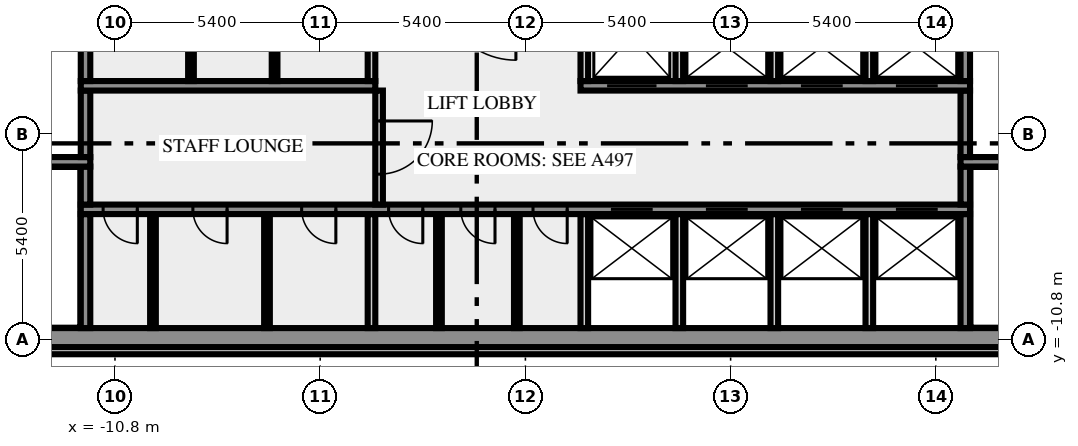
"""IFC4 building model, lengths in metres.
Left out: names, types, materials, properties, quantities, classifications, styles, units other than length and angle.
Written with IfcOpenShell. Run it as: python <this file> out.ifc"""

import sys

from ifc_helpers import new_model, si_unit, direction, frame, frame_2d, origin, place, context, subcontext, project, spatial, rectangle, extrude, element, fill, save


model = new_model("IFC4")
c1 = context("Model", 3, precision=1e-05, world=origin(), true_north=direction((0.0, 1.0)))
c2 = subcontext(c1, "Body", "Model", "MODEL_VIEW")
j1 = project(units=[si_unit("LENGTHUNIT", "METRE"), si_unit("PLANEANGLEUNIT", "RADIAN")], contexts=[c1])
p1 = place(None, origin())
s1 = spatial("IfcSite", under=j1, at=p1, CompositionType="ELEMENT")
p2 = place(p1, origin())
s2 = spatial("IfcBuilding", under=s1, at=p2, CompositionType="ELEMENT")
p3 = place(p2, frame((0.0, 0.0, 222.0)))
s3 = spatial("IfcBuildingStorey", under=s2, at=p3, CompositionType="ELEMENT", Elevation=222.0)
p4 = place(p3, frame((-17.444, -11.088, 0.0), z_axis=(0.0, 0.0, 1.0), x_axis=(1.0, 0.0, 0.0)))
e1 = element("IfcWall", 1, at=p4, inside=s3, PredefinedType="SOLIDWALL", context=c2, shape_type="SweptSolid", body=[
    extrude(rectangle(XDim=34.888, YDim=0.2, at=frame_2d((17.444, 0.0))), origin(), (0.0, 0.0, 1.0), 3.65),
])
p5 = place(p3, frame((-20.0, -10.75, 0.0), z_axis=(0.0, 0.0, 1.0), x_axis=(1.0, 0.0, 0.0)))
e2 = element("IfcWall", 2, at=p5, inside=s3, PredefinedType="SHEAR", context=c2, shape_type="SweptSolid", body=[
    extrude(rectangle(XDim=40.0, YDim=0.5, at=frame_2d((20.0, 0.0))), origin(), (0.0, 0.0, 1.0), 3.65),
])
p6 = place(p5, frame((0.8, 0.0, 1.0)))
e3 = element("IfcOpeningElement", 3, at=p6, cuts=e2, PredefinedType="OPENING", context=c2, shape_type="SweptSolid", body=[
    extrude(rectangle(XDim=1.2, YDim=1.2, at=frame_2d((0.6, 0.6))), frame((0.0, 0.26, 0.0), z_axis=(0.0, -1.0, 0.0), x_axis=(1.0, 0.0, 0.0)), (0.0, 0.0, 1.0), 0.52),
])
p7 = place(p5, frame((38.0, 0.0, 1.0)))
e4 = element("IfcOpeningElement", 4, at=p7, cuts=e2, PredefinedType="OPENING", context=c2, shape_type="SweptSolid", body=[
    extrude(rectangle(XDim=1.2, YDim=1.2, at=frame_2d((0.6, 0.6))), frame((0.0, 0.26, 0.0), z_axis=(0.0, -1.0, 0.0), x_axis=(1.0, 0.0, 0.0)), (0.0, 0.0, 1.0), 0.52),
])
p8 = place(p3, frame((-11.575, -10.5, 0.0), z_axis=(0.0, 0.0, 1.0), x_axis=(0.0, 1.0, 0.0)))
e5 = element("IfcWall", 5, at=p8, inside=s3, PredefinedType="SHEAR", context=c2, shape_type="SweptSolid", body=[
    extrude(rectangle(XDim=3.0, YDim=0.25, at=frame_2d((1.5, 0.0))), origin(), (0.0, 0.0, 1.0), 3.65),
])
for number, where, z_axis, x_axis in (
    (6, (-9.8, -10.5, 0.0), (0.0, 0.0, 1.0), (0.0, 1.0, 0.0)),
    (7, (-6.8, -10.5, 0.0), (0.0, 0.0, 1.0), (0.0, 1.0, 0.0)),
):
    element("IfcWall", number, at=place(p3, frame(where, z_axis=z_axis, x_axis=x_axis)), inside=s3, PredefinedType="PARTITIONING", context=c2, shape_type="SweptSolid", body=[
        extrude(rectangle(XDim=3.0, YDim=0.15, at=frame_2d((1.5, 0.0))), origin(), (0.0, 0.0, 1.0), 3.65),
    ])
p9 = place(p3, frame((-4.05, -10.5, 0.0), z_axis=(0.0, 0.0, 1.0), x_axis=(0.0, 1.0, 0.0)))
e8 = element("IfcWall", 8, at=p9, inside=s3, PredefinedType="SOLIDWALL", context=c2, shape_type="SweptSolid", body=[
    extrude(rectangle(XDim=3.0, YDim=0.2, at=frame_2d((1.5, 0.0))), origin(), (0.0, 0.0, 1.0), 3.65),
])
for number, where, z_axis, x_axis in (
    (9, (-2.275, -10.5, 0.0), (0.0, 0.0, 1.0), (0.0, 1.0, 0.0)),
    (10, (-0.225, -10.5, 0.0), (0.0, 0.0, 1.0), (0.0, 1.0, 0.0)),
):
    element("IfcWall", number, at=place(p3, frame(where, z_axis=z_axis, x_axis=x_axis)), inside=s3, PredefinedType="PARTITIONING", context=c2, shape_type="SweptSolid", body=[
        extrude(rectangle(XDim=3.0, YDim=0.15, at=frame_2d((1.5, 0.0))), origin(), (0.0, 0.0, 1.0), 3.65),
    ])
for number, where, z_axis, x_axis in (
    (11, (1.55, -10.5, 0.0), (0.0, 0.0, 1.0), (0.0, 1.0, 0.0)),
    (12, (4.05, -10.5, 0.0), (0.0, 0.0, 1.0), (0.0, 1.0, 0.0)),
    (13, (6.55, -10.5, 0.0), (0.0, 0.0, 1.0), (0.0, 1.0, 0.0)),
    (14, (9.05, -10.5, 0.0), (0.0, 0.0, 1.0), (0.0, 1.0, 0.0)),
):
    element("IfcWall", number, at=place(p3, frame(where, z_axis=z_axis, x_axis=x_axis)), inside=s3, PredefinedType="SOLIDWALL", context=c2, shape_type="SweptSolid", body=[
        extrude(rectangle(XDim=3.0, YDim=0.2, at=frame_2d((1.5, 0.0))), origin(), (0.0, 0.0, 1.0), 3.65),
    ])
p10 = place(p3, frame((11.575, -10.5, 0.0), z_axis=(0.0, 0.0, 1.0), x_axis=(0.0, 1.0, 0.0)))
e15 = element("IfcWall", 15, at=p10, inside=s3, PredefinedType="SHEAR", context=c2, shape_type="SweptSolid", body=[
    extrude(rectangle(XDim=3.0, YDim=0.25, at=frame_2d((1.5, 0.0))), origin(), (0.0, 0.0, 1.0), 3.65),
])
p11 = place(p3, frame((11.7, -7.375, 0.0), z_axis=(0.0, 0.0, 1.0), x_axis=(-1.0, 0.0, 0.0)))
e16 = element("IfcWall", 16, at=p11, inside=s3, PredefinedType="SHEAR", context=c2, shape_type="SweptSolid", body=[
    extrude(rectangle(XDim=23.4, YDim=0.25, at=frame_2d((11.7, 0.0))), origin(), (0.0, 0.0, 1.0), 3.65),
])
p12 = place(p11, frame((21.912, 0.0, 0.0)))
e17 = element("IfcOpeningElement", 17, at=p12, cuts=e16, PredefinedType="OPENING", context=c2, shape_type="SweptSolid", body=[
    extrude(rectangle(XDim=0.9, YDim=2.1, at=frame_2d((0.45, 1.05))), frame((0.0, 0.135, 0.0), z_axis=(0.0, -1.0, 0.0), x_axis=(1.0, 0.0, 0.0)), (0.0, 0.0, 1.0), 0.27),
])
p13 = place(p11, frame((19.55, 0.0, 0.0)))
e18 = element("IfcOpeningElement", 18, at=p13, cuts=e16, PredefinedType="OPENING", context=c2, shape_type="SweptSolid", body=[
    extrude(rectangle(XDim=0.9, YDim=2.1, at=frame_2d((0.45, 1.05))), frame((0.0, 0.135, 0.0), z_axis=(0.0, -1.0, 0.0), x_axis=(1.0, 0.0, 0.0)), (0.0, 0.0, 1.0), 0.27),
])
p14 = place(p11, frame((16.688, 0.0, 0.0)))
e19 = element("IfcOpeningElement", 19, at=p14, cuts=e16, PredefinedType="OPENING", context=c2, shape_type="SweptSolid", body=[
    extrude(rectangle(XDim=0.9, YDim=2.1, at=frame_2d((0.45, 1.05))), frame((0.0, 0.135, 0.0), z_axis=(0.0, -1.0, 0.0), x_axis=(1.0, 0.0, 0.0)), (0.0, 0.0, 1.0), 0.27),
])
p15 = place(p11, frame((14.4, 0.0, 0.0)))
e20 = element("IfcOpeningElement", 20, at=p15, cuts=e16, PredefinedType="OPENING", context=c2, shape_type="SweptSolid", body=[
    extrude(rectangle(XDim=0.9, YDim=2.1, at=frame_2d((0.45, 1.05))), frame((0.0, 0.135, 0.0), z_axis=(0.0, -1.0, 0.0), x_axis=(1.0, 0.0, 0.0)), (0.0, 0.0, 1.0), 0.27),
])
p16 = place(p11, frame((12.5, 0.0, 0.0)))
e21 = element("IfcOpeningElement", 21, at=p16, cuts=e16, PredefinedType="OPENING", context=c2, shape_type="SweptSolid", body=[
    extrude(rectangle(XDim=0.9, YDim=2.1, at=frame_2d((0.45, 1.05))), frame((0.0, 0.135, 0.0), z_axis=(0.0, -1.0, 0.0), x_axis=(1.0, 0.0, 0.0)), (0.0, 0.0, 1.0), 0.27),
])
p17 = place(p11, frame((10.6, 0.0, 0.0)))
e22 = element("IfcOpeningElement", 22, at=p17, cuts=e16, PredefinedType="OPENING", context=c2, shape_type="SweptSolid", body=[
    extrude(rectangle(XDim=0.9, YDim=2.1, at=frame_2d((0.45, 1.05))), frame((0.0, 0.135, 0.0), z_axis=(0.0, -1.0, 0.0), x_axis=(1.0, 0.0, 0.0)), (0.0, 0.0, 1.0), 0.27),
])
p18 = place(p11, frame((8.35, 0.0, 0.0)))
e23 = element("IfcOpeningElement", 23, at=p18, cuts=e16, PredefinedType="OPENING", context=c2, shape_type="SweptSolid", body=[
    extrude(rectangle(XDim=1.1, YDim=2.1, at=frame_2d((0.55, 1.05))), frame((0.0, 0.135, 0.0), z_axis=(0.0, -1.0, 0.0), x_axis=(1.0, 0.0, 0.0)), (0.0, 0.0, 1.0), 0.27),
])
p19 = place(p11, frame((5.85, 0.0, 0.0)))
e24 = element("IfcOpeningElement", 24, at=p19, cuts=e16, PredefinedType="OPENING", context=c2, shape_type="SweptSolid", body=[
    extrude(rectangle(XDim=1.1, YDim=2.1, at=frame_2d((0.55, 1.05))), frame((0.0, 0.135, 0.0), z_axis=(0.0, -1.0, 0.0), x_axis=(1.0, 0.0, 0.0)), (0.0, 0.0, 1.0), 0.27),
])
p20 = place(p11, frame((3.35, 0.0, 0.0)))
e25 = element("IfcOpeningElement", 25, at=p20, cuts=e16, PredefinedType="OPENING", context=c2, shape_type="SweptSolid", body=[
    extrude(rectangle(XDim=1.1, YDim=2.1, at=frame_2d((0.55, 1.05))), frame((0.0, 0.135, 0.0), z_axis=(0.0, -1.0, 0.0), x_axis=(1.0, 0.0, 0.0)), (0.0, 0.0, 1.0), 0.27),
])
p21 = place(p11, frame((0.85, 0.0, 0.0)))
e26 = element("IfcOpeningElement", 26, at=p21, cuts=e16, PredefinedType="OPENING", context=c2, shape_type="SweptSolid", body=[
    extrude(rectangle(XDim=1.1, YDim=2.1, at=frame_2d((0.55, 1.05))), frame((0.0, 0.135, 0.0), z_axis=(0.0, -1.0, 0.0), x_axis=(1.0, 0.0, 0.0)), (0.0, 0.0, 1.0), 0.27),
])
p22 = place(p3, frame((-11.575, -7.25, 0.0), z_axis=(0.0, 0.0, 1.0), x_axis=(0.0, 1.0, 0.0)))
e27 = element("IfcWall", 27, at=p22, inside=s3, PredefinedType="SHEAR", context=c2, shape_type="SweptSolid", body=[
    extrude(rectangle(XDim=1.0, YDim=0.25, at=frame_2d((0.5, 0.0))), origin(), (0.0, 0.0, 1.0), 3.65),
])
p23 = place(p3, frame((-3.85, -4.25, 0.0), z_axis=(0.0, 0.0, 1.0), x_axis=(0.0, -1.0, 0.0)))
e28 = element("IfcWall", 28, at=p23, inside=s3, PredefinedType="SOLIDWALL", context=c2, shape_type="SweptSolid", body=[
    extrude(rectangle(XDim=3.0, YDim=0.2, at=frame_2d((1.5, 0.0))), origin(), (0.0, 0.0, 1.0), 3.65),
])
p24 = place(p23, frame((0.8, 0.0, 0.0)))
e29 = element("IfcOpeningElement", 29, at=p24, cuts=e28, PredefinedType="OPENING", context=c2, shape_type="SweptSolid", body=[
    extrude(rectangle(XDim=1.4, YDim=2.1, at=frame_2d((0.7, 1.05))), frame((0.0, 0.11, 0.0), z_axis=(0.0, -1.0, 0.0), x_axis=(1.0, 0.0, 0.0)), (0.0, 0.0, 1.0), 0.22),
])
p25 = place(p3, frame((11.575, -7.25, 0.0), z_axis=(0.0, 0.0, 1.0), x_axis=(0.0, 1.0, 0.0)))
e30 = element("IfcWall", 30, at=p25, inside=s3, PredefinedType="SHEAR", context=c2, shape_type="SweptSolid", body=[
    extrude(rectangle(XDim=1.0, YDim=0.25, at=frame_2d((0.5, 0.0))), origin(), (0.0, 0.0, 1.0), 3.65),
])
p26 = place(p3, frame((-11.45, -6.125, 0.0), z_axis=(0.0, 0.0, 1.0), x_axis=(-1.0, 0.0, 0.0)))
e31 = element("IfcWall", 31, at=p26, inside=s3, PredefinedType="SHEAR", context=c2, shape_type="SweptSolid", body=[
    extrude(rectangle(XDim=8.05, YDim=0.25, at=frame_2d((4.025, 0.0))), origin(), (0.0, 0.0, 1.0), 3.65),
])
p27 = place(p26, frame((6.2, 0.0, 0.0)))
e32 = element("IfcOpeningElement", 32, at=p27, cuts=e31, PredefinedType="OPENING", context=c2, shape_type="SweptSolid", body=[
    extrude(rectangle(XDim=1.8, YDim=2.1, at=frame_2d((0.9, 1.05))), frame((0.0, 0.135, 0.0), z_axis=(0.0, -1.0, 0.0), x_axis=(1.0, 0.0, 0.0)), (0.0, 0.0, 1.0), 0.27),
])
p28 = place(p3, frame((19.5, -6.125, 0.0), z_axis=(0.0, 0.0, 1.0), x_axis=(-1.0, 0.0, 0.0)))
e33 = element("IfcWall", 33, at=p28, inside=s3, PredefinedType="SHEAR", context=c2, shape_type="SweptSolid", body=[
    extrude(rectangle(XDim=8.05, YDim=0.25, at=frame_2d((4.025, 0.0))), origin(), (0.0, 0.0, 1.0), 3.65),
])
p29 = place(p28, frame((0.05, 0.0, 0.0)))
e34 = element("IfcOpeningElement", 34, at=p29, cuts=e33, PredefinedType="OPENING", context=c2, shape_type="SweptSolid", body=[
    extrude(rectangle(XDim=1.8, YDim=2.1, at=frame_2d((0.9, 1.05))), frame((0.0, 0.135, 0.0), z_axis=(0.0, -1.0, 0.0), x_axis=(1.0, 0.0, 0.0)), (0.0, 0.0, 1.0), 0.27),
])
for number, where, z_axis, x_axis in (
    (35, (-11.575, -6.0, 0.0), (0.0, 0.0, 1.0), (0.0, 1.0, 0.0)),
    (36, (11.575, -6.0, 0.0), (0.0, 0.0, 1.0), (0.0, 1.0, 0.0)),
):
    element("IfcWall", number, at=place(p3, frame(where, z_axis=z_axis, x_axis=x_axis)), inside=s3, PredefinedType="SHEAR", context=c2, shape_type="SweptSolid", body=[
        extrude(rectangle(XDim=1.75, YDim=0.25, at=frame_2d((0.875, 0.0))), origin(), (0.0, 0.0, 1.0), 3.65),
    ])
p30 = place(p3, frame((-11.7, -4.125, 0.0), z_axis=(0.0, 0.0, 1.0), x_axis=(1.0, 0.0, 0.0)))
e37 = element("IfcWall", 37, at=p30, inside=s3, PredefinedType="SHEAR", context=c2, shape_type="SweptSolid", body=[
    extrude(rectangle(XDim=7.75, YDim=0.25, at=frame_2d((3.875, 0.0))), origin(), (0.0, 0.0, 1.0), 3.65),
])
p31 = place(p3, frame((1.45, -4.125, 0.0), z_axis=(0.0, 0.0, 1.0), x_axis=(1.0, 0.0, 0.0)))
e38 = element("IfcWall", 38, at=p31, inside=s3, PredefinedType="SHEAR", context=c2, shape_type="SweptSolid", body=[
    extrude(rectangle(XDim=10.25, YDim=0.25, at=frame_2d((5.125, 0.0))), origin(), (0.0, 0.0, 1.0), 3.65),
])
p32 = place(p31, frame((0.7, 0.0, 0.0)))
e39 = element("IfcOpeningElement", 39, at=p32, cuts=e38, PredefinedType="OPENING", context=c2, shape_type="SweptSolid", body=[
    extrude(rectangle(XDim=1.3, YDim=2.1, at=frame_2d((0.65, 1.05))), frame((0.0, 0.135, 0.0), z_axis=(0.0, -1.0, 0.0), x_axis=(1.0, 0.0, 0.0)), (0.0, 0.0, 1.0), 0.27),
])
p33 = place(p31, frame((3.3, 0.0, 0.0)))
e40 = element("IfcOpeningElement", 40, at=p33, cuts=e38, PredefinedType="OPENING", context=c2, shape_type="SweptSolid", body=[
    extrude(rectangle(XDim=1.1, YDim=2.1, at=frame_2d((0.55, 1.05))), frame((0.0, 0.135, 0.0), z_axis=(0.0, -1.0, 0.0), x_axis=(1.0, 0.0, 0.0)), (0.0, 0.0, 1.0), 0.27),
])
p34 = place(p31, frame((5.8, 0.0, 0.0)))
e41 = element("IfcOpeningElement", 41, at=p34, cuts=e38, PredefinedType="OPENING", context=c2, shape_type="SweptSolid", body=[
    extrude(rectangle(XDim=1.1, YDim=2.1, at=frame_2d((0.55, 1.05))), frame((0.0, 0.135, 0.0), z_axis=(0.0, -1.0, 0.0), x_axis=(1.0, 0.0, 0.0)), (0.0, 0.0, 1.0), 0.27),
])
p35 = place(p31, frame((8.3, 0.0, 0.0)))
e42 = element("IfcOpeningElement", 42, at=p35, cuts=e38, PredefinedType="OPENING", context=c2, shape_type="SweptSolid", body=[
    extrude(rectangle(XDim=1.1, YDim=2.1, at=frame_2d((0.55, 1.05))), frame((0.0, 0.135, 0.0), z_axis=(0.0, -1.0, 0.0), x_axis=(1.0, 0.0, 0.0)), (0.0, 0.0, 1.0), 0.27),
])
p36 = place(p3, frame((-11.575, -4.0, 0.0), z_axis=(0.0, 0.0, 1.0), x_axis=(0.0, 1.0, 0.0)))
e43 = element("IfcWall", 43, at=p36, inside=s3, PredefinedType="SHEAR", context=c2, shape_type="SweptSolid", body=[
    extrude(rectangle(XDim=2.3, YDim=0.25, at=frame_2d((1.15, 0.0))), origin(), (0.0, 0.0, 1.0), 3.65),
])
for number, where, z_axis, x_axis in (
    (44, (-8.8, -4.0, 0.0), (0.0, 0.0, 1.0), (0.0, 1.0, 0.0)),
    (45, (-6.6, -4.0, 0.0), (0.0, 0.0, 1.0), (0.0, 1.0, 0.0)),
):
    element("IfcWall", number, at=place(p3, frame(where, z_axis=z_axis, x_axis=x_axis)), inside=s3, PredefinedType="PARTITIONING", context=c2, shape_type="SweptSolid", body=[
        extrude(rectangle(XDim=2.3, YDim=0.15, at=frame_2d((1.15, 0.0))), origin(), (0.0, 0.0, 1.0), 3.65),
    ])
for number, where, z_axis, x_axis in (
    (46, (-4.05, -4.0, 0.0), (0.0, 0.0, 1.0), (0.0, 1.0, 0.0)),
    (47, (1.55, -4.0, 0.0), (0.0, 0.0, 1.0), (0.0, 1.0, 0.0)),
    (48, (4.05, -4.0, 0.0), (0.0, 0.0, 1.0), (0.0, 1.0, 0.0)),
    (49, (6.55, -4.0, 0.0), (0.0, 0.0, 1.0), (0.0, 1.0, 0.0)),
    (50, (9.05, -4.0, 0.0), (0.0, 0.0, 1.0), (0.0, 1.0, 0.0)),
):
    element("IfcWall", number, at=place(p3, frame(where, z_axis=z_axis, x_axis=x_axis)), inside=s3, PredefinedType="SOLIDWALL", context=c2, shape_type="SweptSolid", body=[
        extrude(rectangle(XDim=2.3, YDim=0.2, at=frame_2d((1.15, 0.0))), origin(), (0.0, 0.0, 1.0), 3.65),
    ])
p37 = place(p3, frame((11.575, -4.0, 0.0), z_axis=(0.0, 0.0, 1.0), x_axis=(0.0, 1.0, 0.0)))
e51 = element("IfcWall", 51, at=p37, inside=s3, PredefinedType="SHEAR", context=c2, shape_type="SweptSolid", body=[
    extrude(rectangle(XDim=2.3, YDim=0.25, at=frame_2d((1.15, 0.0))), origin(), (0.0, 0.0, 1.0), 3.65),
])
p38 = place(p12, origin())
e52 = element("IfcDoor", 52, at=p38, inside=s3, OperationType="SINGLE_SWING_RIGHT", PredefinedType="DOOR", context=c2, shape_type="SweptSolid", body=[
    extrude(rectangle(XDim=0.9, YDim=2.1, at=frame_2d((0.45, 1.05))), frame((0.0, 0.025, 0.0), z_axis=(0.0, -1.0, 0.0), x_axis=(1.0, 0.0, 0.0)), (0.0, 0.0, 1.0), 0.05),
])
fill(e17, e52)
p39 = place(p13, origin())
e53 = element("IfcDoor", 53, at=p39, inside=s3, OperationType="SINGLE_SWING_RIGHT", PredefinedType="DOOR", context=c2, shape_type="SweptSolid", body=[
    extrude(rectangle(XDim=0.9, YDim=2.1, at=frame_2d((0.45, 1.05))), frame((0.0, 0.025, 0.0), z_axis=(0.0, -1.0, 0.0), x_axis=(1.0, 0.0, 0.0)), (0.0, 0.0, 1.0), 0.05),
])
fill(e18, e53)
p40 = place(p14, origin())
e54 = element("IfcDoor", 54, at=p40, inside=s3, OperationType="SINGLE_SWING_RIGHT", PredefinedType="DOOR", context=c2, shape_type="SweptSolid", body=[
    extrude(rectangle(XDim=0.9, YDim=2.1, at=frame_2d((0.45, 1.05))), frame((0.0, 0.025, 0.0), z_axis=(0.0, -1.0, 0.0), x_axis=(1.0, 0.0, 0.0)), (0.0, 0.0, 1.0), 0.05),
])
fill(e19, e54)
p41 = place(p15, origin())
e55 = element("IfcDoor", 55, at=p41, inside=s3, OperationType="SINGLE_SWING_RIGHT", PredefinedType="DOOR", context=c2, shape_type="SweptSolid", body=[
    extrude(rectangle(XDim=0.9, YDim=2.1, at=frame_2d((0.45, 1.05))), frame((0.0, 0.025, 0.0), z_axis=(0.0, -1.0, 0.0), x_axis=(1.0, 0.0, 0.0)), (0.0, 0.0, 1.0), 0.05),
])
fill(e20, e55)
p42 = place(p16, origin())
e56 = element("IfcDoor", 56, at=p42, inside=s3, OperationType="SINGLE_SWING_RIGHT", PredefinedType="DOOR", context=c2, shape_type="SweptSolid", body=[
    extrude(rectangle(XDim=0.9, YDim=2.1, at=frame_2d((0.45, 1.05))), frame((0.0, 0.025, 0.0), z_axis=(0.0, -1.0, 0.0), x_axis=(1.0, 0.0, 0.0)), (0.0, 0.0, 1.0), 0.05),
])
fill(e21, e56)
p43 = place(p17, origin())
e57 = element("IfcDoor", 57, at=p43, inside=s3, OperationType="SINGLE_SWING_LEFT", PredefinedType="DOOR", context=c2, shape_type="SweptSolid", body=[
    extrude(rectangle(XDim=0.9, YDim=2.1, at=frame_2d((0.45, 1.05))), frame((0.0, 0.025, 0.0), z_axis=(0.0, -1.0, 0.0), x_axis=(1.0, 0.0, 0.0)), (0.0, 0.0, 1.0), 0.05),
])
fill(e22, e57)
p44 = place(p18, origin())
e58 = element("IfcDoor", 58, at=p44, inside=s3, OperationType="DOUBLE_DOOR_SLIDING", PredefinedType="DOOR", context=c2, shape_type="SweptSolid", body=[
    extrude(rectangle(XDim=1.1, YDim=2.1, at=frame_2d((0.55, 1.05))), frame((0.0, 0.025, 0.0), z_axis=(0.0, -1.0, 0.0), x_axis=(1.0, 0.0, 0.0)), (0.0, 0.0, 1.0), 0.05),
])
fill(e23, e58)
p45 = place(p19, origin())
e59 = element("IfcDoor", 59, at=p45, inside=s3, OperationType="DOUBLE_DOOR_SLIDING", PredefinedType="DOOR", context=c2, shape_type="SweptSolid", body=[
    extrude(rectangle(XDim=1.1, YDim=2.1, at=frame_2d((0.55, 1.05))), frame((0.0, 0.025, 0.0), z_axis=(0.0, -1.0, 0.0), x_axis=(1.0, 0.0, 0.0)), (0.0, 0.0, 1.0), 0.05),
])
fill(e24, e59)
p46 = place(p20, origin())
e60 = element("IfcDoor", 60, at=p46, inside=s3, OperationType="DOUBLE_DOOR_SLIDING", PredefinedType="DOOR", context=c2, shape_type="SweptSolid", body=[
    extrude(rectangle(XDim=1.1, YDim=2.1, at=frame_2d((0.55, 1.05))), frame((0.0, 0.025, 0.0), z_axis=(0.0, -1.0, 0.0), x_axis=(1.0, 0.0, 0.0)), (0.0, 0.0, 1.0), 0.05),
])
fill(e25, e60)
p47 = place(p21, origin())
e61 = element("IfcDoor", 61, at=p47, inside=s3, OperationType="DOUBLE_DOOR_SLIDING", PredefinedType="DOOR", context=c2, shape_type="SweptSolid", body=[
    extrude(rectangle(XDim=1.1, YDim=2.1, at=frame_2d((0.55, 1.05))), frame((0.0, 0.025, 0.0), z_axis=(0.0, -1.0, 0.0), x_axis=(1.0, 0.0, 0.0)), (0.0, 0.0, 1.0), 0.05),
])
fill(e26, e61)
p48 = place(p24, origin())
e62 = element("IfcDoor", 62, at=p48, inside=s3, OperationType="DOUBLE_DOOR_SINGLE_SWING", PredefinedType="DOOR", context=c2, shape_type="SweptSolid", body=[
    extrude(rectangle(XDim=1.4, YDim=2.1, at=frame_2d((0.7, 1.05))), frame((0.0, 0.025, 0.0), z_axis=(0.0, -1.0, 0.0), x_axis=(1.0, 0.0, 0.0)), (0.0, 0.0, 1.0), 0.05),
])
fill(e29, e62)
p49 = place(p32, origin())
e63 = element("IfcDoor", 63, at=p49, inside=s3, OperationType="DOUBLE_DOOR_SLIDING", PredefinedType="DOOR", context=c2, shape_type="SweptSolid", body=[
    extrude(rectangle(XDim=1.3, YDim=2.1, at=frame_2d((0.65, 1.05))), frame((0.0, 0.025, 0.0), z_axis=(0.0, -1.0, 0.0), x_axis=(1.0, 0.0, 0.0)), (0.0, 0.0, 1.0), 0.05),
])
fill(e39, e63)
p50 = place(p33, origin())
e64 = element("IfcDoor", 64, at=p50, inside=s3, OperationType="DOUBLE_DOOR_SLIDING", PredefinedType="DOOR", context=c2, shape_type="SweptSolid", body=[
    extrude(rectangle(XDim=1.1, YDim=2.1, at=frame_2d((0.55, 1.05))), frame((0.0, 0.025, 0.0), z_axis=(0.0, -1.0, 0.0), x_axis=(1.0, 0.0, 0.0)), (0.0, 0.0, 1.0), 0.05),
])
fill(e40, e64)
p51 = place(p34, origin())
e65 = element("IfcDoor", 65, at=p51, inside=s3, OperationType="DOUBLE_DOOR_SLIDING", PredefinedType="DOOR", context=c2, shape_type="SweptSolid", body=[
    extrude(rectangle(XDim=1.1, YDim=2.1, at=frame_2d((0.55, 1.05))), frame((0.0, 0.025, 0.0), z_axis=(0.0, -1.0, 0.0), x_axis=(1.0, 0.0, 0.0)), (0.0, 0.0, 1.0), 0.05),
])
fill(e41, e65)
p52 = place(p35, origin())
e66 = element("IfcDoor", 66, at=p52, inside=s3, OperationType="DOUBLE_DOOR_SLIDING", PredefinedType="DOOR", context=c2, shape_type="SweptSolid", body=[
    extrude(rectangle(XDim=1.1, YDim=2.1, at=frame_2d((0.55, 1.05))), frame((0.0, 0.025, 0.0), z_axis=(0.0, -1.0, 0.0), x_axis=(1.0, 0.0, 0.0)), (0.0, 0.0, 1.0), 0.05),
])
fill(e42, e66)
save(model, sys.argv[1])
